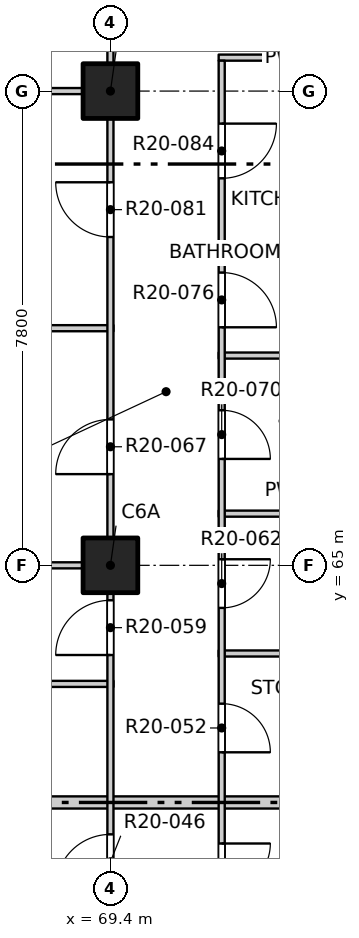
"""IFC4 building model, lengths in metres.
Left out: names, types, materials, properties, quantities, classifications, styles, units other than length and angle.
Written with IfcOpenShell. Run it as: python <this file> out.ifc"""

import sys

from ifc_helpers import new_model, si_unit, direction, frame, frame_2d, origin, origin_2d, place, context, subcontext, project, spatial, rectangle, extrude, element, fill, save


model = new_model("IFC4")
c1 = context("Model", 3, precision=1e-05, world=origin(), true_north=direction((0.0, 1.0)))
c2 = subcontext(c1, "Body", "Model", "MODEL_VIEW")
j1 = project(units=[si_unit("LENGTHUNIT", "METRE"), si_unit("PLANEANGLEUNIT", "RADIAN")], contexts=[c1])
p1 = place(None, origin())
s1 = spatial("IfcSite", under=j1, at=p1, CompositionType="ELEMENT")
p2 = place(p1, origin())
s2 = spatial("IfcBuilding", under=s1, at=p2, CompositionType="ELEMENT")
p3 = place(p2, frame((0.0, 0.0, 210.9)))
s3 = spatial("IfcBuildingStorey", under=s2, at=p3, CompositionType="ELEMENT", Elevation=210.9)
for number, where, z_axis, x_axis in (
    (1, (69.4, 65.0, -0.25), (0.0, 0.0, 1.0), (1.0, 0.0, 0.0)),
    (2, (69.4, 72.8, -0.25), (0.0, 0.0, 1.0), (1.0, 0.0, 0.0)),
):
    element("IfcColumn", number, at=place(p3, frame(where, z_axis=z_axis, x_axis=x_axis)), inside=s3, PredefinedType="COLUMN", context=c2, shape_type="SweptSolid", body=[
        extrude(rectangle(XDim=0.9, YDim=0.9, at=origin_2d()), origin(), (0.0, 0.0, 1.0), 3.4),
    ])
p4 = place(p3, frame((61.9, 61.1, 0.0), z_axis=(0.0, 0.0, 1.0), x_axis=(1.0, 0.0, 0.0)))
e3 = element("IfcWall", 3, at=p4, inside=s3, PredefinedType="PARTITIONING", context=c2, shape_type="SweptSolid", body=[
    extrude(rectangle(XDim=11.5, YDim=0.2, at=frame_2d((5.75, 0.0))), origin(), (0.0, 0.0, 1.0), 2.55),
])
p5 = place(p3, frame((65.75, 63.05, 0.0), z_axis=(0.0, 0.0, 1.0), x_axis=(1.0, 0.0, 0.0)))
e4 = element("IfcWall", 4, at=p5, inside=s3, PredefinedType="PARTITIONING", context=c2, shape_type="SweptSolid", body=[
    extrude(rectangle(XDim=3.7, YDim=0.1, at=frame_2d((1.85, 0.0))), origin(), (0.0, 0.0, 1.0), 3.15),
])
p6 = place(p3, frame((71.18, 63.55, 0.0), z_axis=(0.0, 0.0, 1.0), x_axis=(1.0, 0.0, 0.0)))
e5 = element("IfcWall", 5, at=p6, inside=s3, PredefinedType="PARTITIONING", context=c2, shape_type="SweptSolid", body=[
    extrude(rectangle(XDim=2.22, YDim=0.1, at=frame_2d((1.11, 0.0))), origin(), (0.0, 0.0, 1.0), 3.15),
])
p7 = place(p3, frame((61.9, 65.0, 0.0), z_axis=(0.0, 0.0, 1.0), x_axis=(1.0, 0.0, 0.0)))
e6 = element("IfcWall", 6, at=p7, inside=s3, PredefinedType="PARTITIONING", context=c2, shape_type="SweptSolid", body=[
    extrude(rectangle(XDim=7.55, YDim=0.1, at=frame_2d((3.775, 0.0))), origin(), (0.0, 0.0, 1.0), 3.15),
])
for number, where, z_axis, x_axis in (
    (7, (71.18, 65.85, 0.0), (0.0, 0.0, 1.0), (1.0, 0.0, 0.0)),
    (8, (71.18, 68.45, 0.0), (0.0, 0.0, 1.0), (1.0, 0.0, 0.0)),
):
    element("IfcWall", number, at=place(p3, frame(where, z_axis=z_axis, x_axis=x_axis)), inside=s3, PredefinedType="PARTITIONING", context=c2, shape_type="SweptSolid", body=[
        extrude(rectangle(XDim=2.22, YDim=0.1, at=frame_2d((1.11, 0.0))), origin(), (0.0, 0.0, 1.0), 3.15),
    ])
p8 = place(p3, frame((61.9, 68.9, 0.0), z_axis=(0.0, 0.0, 1.0), x_axis=(1.0, 0.0, 0.0)))
e9 = element("IfcWall", 9, at=p8, inside=s3, PredefinedType="PARTITIONING", context=c2, shape_type="SweptSolid", body=[
    extrude(rectangle(XDim=7.55, YDim=0.1, at=frame_2d((3.775, 0.0))), origin(), (0.0, 0.0, 1.0), 2.55),
])
p9 = place(p3, frame((71.18, 70.28, 0.0), z_axis=(0.0, 0.0, 1.0), x_axis=(1.0, 0.0, 0.0)))
e10 = element("IfcWall", 10, at=p9, inside=s3, PredefinedType="PARTITIONING", context=c2, shape_type="SweptSolid", body=[
    extrude(rectangle(XDim=2.22, YDim=0.1, at=frame_2d((1.11, 0.0))), origin(), (0.0, 0.0, 1.0), 3.15),
])
p10 = place(p3, frame((61.9, 72.8, 0.0), z_axis=(0.0, 0.0, 1.0), x_axis=(1.0, 0.0, 0.0)))
e11 = element("IfcWall", 11, at=p10, inside=s3, PredefinedType="PARTITIONING", context=c2, shape_type="SweptSolid", body=[
    extrude(rectangle(XDim=7.55, YDim=0.1, at=frame_2d((3.775, 0.0))), origin(), (0.0, 0.0, 1.0), 3.15),
])
p11 = place(p3, frame((71.18, 73.35, 0.0), z_axis=(0.0, 0.0, 1.0), x_axis=(1.0, 0.0, 0.0)))
e12 = element("IfcWall", 12, at=p11, inside=s3, PredefinedType="PARTITIONING", context=c2, shape_type="SweptSolid", body=[
    extrude(rectangle(XDim=2.22, YDim=0.1, at=frame_2d((1.11, 0.0))), origin(), (0.0, 0.0, 1.0), 3.15),
])
p12 = place(p3, frame((69.4, 41.9, 0.0), z_axis=(0.0, 0.0, 1.0), x_axis=(0.0, 1.0, 0.0)))
e13 = element("IfcWall", 13, at=p12, inside=s3, PredefinedType="PARTITIONING", context=c2, shape_type="SweptSolid", body=[
    extrude(rectangle(XDim=46.2, YDim=0.1, at=frame_2d((23.1, 0.0))), origin(), (0.0, 0.0, 1.0), 3.15),
])
p13 = place(p12, frame((1.2, 0.0, 0.0)))
e14 = element("IfcOpeningElement", 14, at=p13, cuts=e13, PredefinedType="OPENING", context=c2, shape_type="SweptSolid", body=[
    extrude(rectangle(XDim=0.9, YDim=2.1, at=frame_2d((0.45, 1.05))), frame((0.0, 0.06, 0.0), z_axis=(0.0, -1.0, 0.0), x_axis=(1.0, 0.0, 0.0)), (0.0, 0.0, 1.0), 0.12),
])
p14 = place(p12, frame((5.1, 0.0, 0.0)))
e15 = element("IfcOpeningElement", 15, at=p14, cuts=e13, PredefinedType="OPENING", context=c2, shape_type="SweptSolid", body=[
    extrude(rectangle(XDim=0.9, YDim=2.1, at=frame_2d((0.45, 1.05))), frame((0.0, 0.06, 0.0), z_axis=(0.0, -1.0, 0.0), x_axis=(1.0, 0.0, 0.0)), (0.0, 0.0, 1.0), 0.12),
])
p15 = place(p12, frame((9.975, 0.0, 0.0)))
e16 = element("IfcOpeningElement", 16, at=p15, cuts=e13, PredefinedType="OPENING", context=c2, shape_type="SweptSolid", body=[
    extrude(rectangle(XDim=0.9, YDim=2.1, at=frame_2d((0.45, 1.05))), frame((0.0, 0.06, 0.0), z_axis=(0.0, -1.0, 0.0), x_axis=(1.0, 0.0, 0.0)), (0.0, 0.0, 1.0), 0.12),
])
p16 = place(p12, frame((12.9, 0.0, 0.0)))
e17 = element("IfcOpeningElement", 17, at=p16, cuts=e13, PredefinedType="OPENING", context=c2, shape_type="SweptSolid", body=[
    extrude(rectangle(XDim=0.9, YDim=2.1, at=frame_2d((0.45, 1.05))), frame((0.0, 0.06, 0.0), z_axis=(0.0, -1.0, 0.0), x_axis=(1.0, 0.0, 0.0)), (0.0, 0.0, 1.0), 0.12),
])
p17 = place(p12, frame((17.775, 0.0, 0.0)))
e18 = element("IfcOpeningElement", 18, at=p17, cuts=e13, PredefinedType="OPENING", context=c2, shape_type="SweptSolid", body=[
    extrude(rectangle(XDim=0.9, YDim=2.1, at=frame_2d((0.45, 1.05))), frame((0.0, 0.06, 0.0), z_axis=(0.0, -1.0, 0.0), x_axis=(1.0, 0.0, 0.0)), (0.0, 0.0, 1.0), 0.12),
])
p18 = place(p12, frame((21.625, 0.0, 0.0)))
e19 = element("IfcOpeningElement", 19, at=p18, cuts=e13, PredefinedType="OPENING", context=c2, shape_type="SweptSolid", body=[
    extrude(rectangle(XDim=0.9, YDim=2.1, at=frame_2d((0.45, 1.05))), frame((0.0, 0.06, 0.0), z_axis=(0.0, -1.0, 0.0), x_axis=(1.0, 0.0, 0.0)), (0.0, 0.0, 1.0), 0.12),
])
p19 = place(p12, frame((24.6, 0.0, 0.0)))
e20 = element("IfcOpeningElement", 20, at=p19, cuts=e13, PredefinedType="OPENING", context=c2, shape_type="SweptSolid", body=[
    extrude(rectangle(XDim=0.9, YDim=2.1, at=frame_2d((0.45, 1.05))), frame((0.0, 0.06, 0.0), z_axis=(0.0, -1.0, 0.0), x_axis=(1.0, 0.0, 0.0)), (0.0, 0.0, 1.0), 0.12),
])
p20 = place(p12, frame((28.5, 0.0, 0.0)))
e21 = element("IfcOpeningElement", 21, at=p20, cuts=e13, PredefinedType="OPENING", context=c2, shape_type="SweptSolid", body=[
    extrude(rectangle(XDim=0.9, YDim=2.1, at=frame_2d((0.45, 1.05))), frame((0.0, 0.06, 0.0), z_axis=(0.0, -1.0, 0.0), x_axis=(1.0, 0.0, 0.0)), (0.0, 0.0, 1.0), 0.12),
])
p21 = place(p12, frame((33.375, 0.0, 0.0)))
e22 = element("IfcOpeningElement", 22, at=p21, cuts=e13, PredefinedType="OPENING", context=c2, shape_type="SweptSolid", body=[
    extrude(rectangle(XDim=0.9, YDim=2.1, at=frame_2d((0.45, 1.05))), frame((0.0, 0.06, 0.0), z_axis=(0.0, -1.0, 0.0), x_axis=(1.0, 0.0, 0.0)), (0.0, 0.0, 1.0), 0.12),
])
p22 = place(p12, frame((37.225, 0.0, 0.0)))
e23 = element("IfcOpeningElement", 23, at=p22, cuts=e13, PredefinedType="OPENING", context=c2, shape_type="SweptSolid", body=[
    extrude(rectangle(XDim=0.9, YDim=2.1, at=frame_2d((0.45, 1.05))), frame((0.0, 0.06, 0.0), z_axis=(0.0, -1.0, 0.0), x_axis=(1.0, 0.0, 0.0)), (0.0, 0.0, 1.0), 0.12),
])
p23 = place(p12, frame((40.2, 0.0, 0.0)))
e24 = element("IfcOpeningElement", 24, at=p23, cuts=e13, PredefinedType="OPENING", context=c2, shape_type="SweptSolid", body=[
    extrude(rectangle(XDim=0.9, YDim=2.1, at=frame_2d((0.45, 1.05))), frame((0.0, 0.06, 0.0), z_axis=(0.0, -1.0, 0.0), x_axis=(1.0, 0.0, 0.0)), (0.0, 0.0, 1.0), 0.12),
])
p24 = place(p12, frame((44.1, 0.0, 0.0)))
e25 = element("IfcOpeningElement", 25, at=p24, cuts=e13, PredefinedType="OPENING", context=c2, shape_type="SweptSolid", body=[
    extrude(rectangle(XDim=0.9, YDim=2.1, at=frame_2d((0.45, 1.05))), frame((0.0, 0.06, 0.0), z_axis=(0.0, -1.0, 0.0), x_axis=(1.0, 0.0, 0.0)), (0.0, 0.0, 1.0), 0.12),
])
p25 = place(p3, frame((71.23, 55.05, 0.0), z_axis=(0.0, 0.0, 1.0), x_axis=(0.0, 1.0, 0.0)))
e26 = element("IfcWall", 26, at=p25, inside=s3, PredefinedType="PARTITIONING", context=c2, shape_type="SweptSolid", body=[
    extrude(rectangle(XDim=18.25, YDim=0.1, at=frame_2d((9.125, 0.0))), origin(), (0.0, 0.0, 1.0), 3.15),
])
p26 = place(p25, frame((0.4, 0.0, 0.0)))
e27 = element("IfcOpeningElement", 27, at=p26, cuts=e26, PredefinedType="OPENING", context=c2, shape_type="SweptSolid", body=[
    extrude(rectangle(XDim=0.9, YDim=2.1, at=frame_2d((0.45, 1.05))), frame((0.0, 0.06, 0.0), z_axis=(0.0, -1.0, 0.0), x_axis=(1.0, 0.0, 0.0)), (0.0, 0.0, 1.0), 0.12),
])
p27 = place(p25, frame((2.425, 0.0, 0.0)))
e28 = element("IfcOpeningElement", 28, at=p27, cuts=e26, PredefinedType="OPENING", context=c2, shape_type="SweptSolid", body=[
    extrude(rectangle(XDim=0.8, YDim=2.1, at=frame_2d((0.4, 1.05))), frame((0.0, 0.06, 0.0), z_axis=(0.0, -1.0, 0.0), x_axis=(1.0, 0.0, 0.0)), (0.0, 0.0, 1.0), 0.12),
])
p28 = place(p25, frame((4.575, 0.0, 0.0)))
e29 = element("IfcOpeningElement", 29, at=p28, cuts=e26, PredefinedType="OPENING", context=c2, shape_type="SweptSolid", body=[
    extrude(rectangle(XDim=0.8, YDim=2.1, at=frame_2d((0.4, 1.05))), frame((0.0, 0.06, 0.0), z_axis=(0.0, -1.0, 0.0), x_axis=(1.0, 0.0, 0.0)), (0.0, 0.0, 1.0), 0.12),
])
p29 = place(p25, frame((6.875, 0.0, 0.0)))
e30 = element("IfcOpeningElement", 30, at=p29, cuts=e26, PredefinedType="OPENING", context=c2, shape_type="SweptSolid", body=[
    extrude(rectangle(XDim=0.8, YDim=2.1, at=frame_2d((0.4, 1.05))), frame((0.0, 0.06, 0.0), z_axis=(0.0, -1.0, 0.0), x_axis=(1.0, 0.0, 0.0)), (0.0, 0.0, 1.0), 0.12),
])
p30 = place(p25, frame((9.25, 0.0, 0.0)))
e31 = element("IfcOpeningElement", 31, at=p30, cuts=e26, PredefinedType="OPENING", context=c2, shape_type="SweptSolid", body=[
    extrude(rectangle(XDim=0.8, YDim=2.1, at=frame_2d((0.4, 1.05))), frame((0.0, 0.06, 0.0), z_axis=(0.0, -1.0, 0.0), x_axis=(1.0, 0.0, 0.0)), (0.0, 0.0, 1.0), 0.12),
])
p31 = place(p25, frame((11.7, 0.0, 0.0)))
e32 = element("IfcOpeningElement", 32, at=p31, cuts=e26, PredefinedType="OPENING", context=c2, shape_type="SweptSolid", body=[
    extrude(rectangle(XDim=0.8, YDim=2.1, at=frame_2d((0.4, 1.05))), frame((0.0, 0.06, 0.0), z_axis=(0.0, -1.0, 0.0), x_axis=(1.0, 0.0, 0.0)), (0.0, 0.0, 1.0), 0.12),
])
p32 = place(p25, frame((13.865, 0.0, 0.0)))
e33 = element("IfcOpeningElement", 33, at=p32, cuts=e26, PredefinedType="OPENING", context=c2, shape_type="SweptSolid", body=[
    extrude(rectangle(XDim=0.9, YDim=2.1, at=frame_2d((0.45, 1.05))), frame((0.0, 0.06, 0.0), z_axis=(0.0, -1.0, 0.0), x_axis=(1.0, 0.0, 0.0)), (0.0, 0.0, 1.0), 0.12),
])
p33 = place(p25, frame((16.315, 0.0, 0.0)))
e34 = element("IfcOpeningElement", 34, at=p33, cuts=e26, PredefinedType="OPENING", context=c2, shape_type="SweptSolid", body=[
    extrude(rectangle(XDim=0.9, YDim=2.1, at=frame_2d((0.45, 1.05))), frame((0.0, 0.06, 0.0), z_axis=(0.0, -1.0, 0.0), x_axis=(1.0, 0.0, 0.0)), (0.0, 0.0, 1.0), 0.12),
])
p34 = place(p28, origin())
e35 = element("IfcDoor", 35, at=p34, inside=s3, OperationType="SINGLE_SWING_LEFT", PredefinedType="DOOR", context=c2, shape_type="SweptSolid", body=[
    extrude(rectangle(XDim=0.8, YDim=2.1, at=frame_2d((0.4, 1.05))), frame((0.0, 0.025, 0.0), z_axis=(0.0, -1.0, 0.0), x_axis=(1.0, 0.0, 0.0)), (0.0, 0.0, 1.0), 0.05),
])
fill(e29, e35)
p35 = place(p17, origin())
e36 = element("IfcDoor", 36, at=p35, inside=s3, OperationType="SINGLE_SWING_LEFT", PredefinedType="DOOR", context=c2, shape_type="SweptSolid", body=[
    extrude(rectangle(XDim=0.9, YDim=2.1, at=frame_2d((0.45, 1.05))), frame((0.0, 0.025, 0.0), z_axis=(0.0, -1.0, 0.0), x_axis=(1.0, 0.0, 0.0)), (0.0, 0.0, 1.0), 0.05),
])
fill(e18, e36)
p36 = place(p29, origin())
e37 = element("IfcDoor", 37, at=p36, inside=s3, OperationType="SINGLE_SWING_RIGHT", PredefinedType="DOOR", context=c2, shape_type="SweptSolid", body=[
    extrude(rectangle(XDim=0.8, YDim=2.1, at=frame_2d((0.4, 1.05))), frame((0.0, 0.025, 0.0), z_axis=(0.0, -1.0, 0.0), x_axis=(1.0, 0.0, 0.0)), (0.0, 0.0, 1.0), 0.05),
])
fill(e30, e37)
p37 = place(p18, origin())
e38 = element("IfcDoor", 38, at=p37, inside=s3, OperationType="SINGLE_SWING_LEFT", PredefinedType="DOOR", context=c2, shape_type="SweptSolid", body=[
    extrude(rectangle(XDim=0.9, YDim=2.1, at=frame_2d((0.45, 1.05))), frame((0.0, 0.025, 0.0), z_axis=(0.0, -1.0, 0.0), x_axis=(1.0, 0.0, 0.0)), (0.0, 0.0, 1.0), 0.05),
])
fill(e19, e38)
p38 = place(p30, origin())
e39 = element("IfcDoor", 39, at=p38, inside=s3, OperationType="SINGLE_SWING_LEFT", PredefinedType="DOOR", context=c2, shape_type="SweptSolid", body=[
    extrude(rectangle(XDim=0.8, YDim=2.1, at=frame_2d((0.4, 1.05))), frame((0.0, 0.025, 0.0), z_axis=(0.0, -1.0, 0.0), x_axis=(1.0, 0.0, 0.0)), (0.0, 0.0, 1.0), 0.05),
])
fill(e31, e39)
p39 = place(p19, origin())
e40 = element("IfcDoor", 40, at=p39, inside=s3, OperationType="SINGLE_SWING_LEFT", PredefinedType="DOOR", context=c2, shape_type="SweptSolid", body=[
    extrude(rectangle(XDim=0.9, YDim=2.1, at=frame_2d((0.45, 1.05))), frame((0.0, 0.025, 0.0), z_axis=(0.0, -1.0, 0.0), x_axis=(1.0, 0.0, 0.0)), (0.0, 0.0, 1.0), 0.05),
])
fill(e20, e40)
p40 = place(p31, origin())
e41 = element("IfcDoor", 41, at=p40, inside=s3, OperationType="SINGLE_SWING_RIGHT", PredefinedType="DOOR", context=c2, shape_type="SweptSolid", body=[
    extrude(rectangle(XDim=0.8, YDim=2.1, at=frame_2d((0.4, 1.05))), frame((0.0, 0.025, 0.0), z_axis=(0.0, -1.0, 0.0), x_axis=(1.0, 0.0, 0.0)), (0.0, 0.0, 1.0), 0.05),
])
fill(e32, e41)
p41 = place(p32, origin())
e42 = element("IfcDoor", 42, at=p41, inside=s3, OperationType="SINGLE_SWING_RIGHT", PredefinedType="DOOR", context=c2, shape_type="SweptSolid", body=[
    extrude(rectangle(XDim=0.9, YDim=2.1, at=frame_2d((0.45, 1.05))), frame((0.0, 0.025, 0.0), z_axis=(0.0, -1.0, 0.0), x_axis=(1.0, 0.0, 0.0)), (0.0, 0.0, 1.0), 0.05),
])
fill(e33, e42)
p42 = place(p20, origin())
e43 = element("IfcDoor", 43, at=p42, inside=s3, OperationType="SINGLE_SWING_RIGHT", PredefinedType="DOOR", context=c2, shape_type="SweptSolid", body=[
    extrude(rectangle(XDim=0.9, YDim=2.1, at=frame_2d((0.45, 1.05))), frame((0.0, 0.025, 0.0), z_axis=(0.0, -1.0, 0.0), x_axis=(1.0, 0.0, 0.0)), (0.0, 0.0, 1.0), 0.05),
])
fill(e21, e43)
p43 = place(p33, origin())
e44 = element("IfcDoor", 44, at=p43, inside=s3, OperationType="SINGLE_SWING_LEFT", PredefinedType="DOOR", context=c2, shape_type="SweptSolid", body=[
    extrude(rectangle(XDim=0.9, YDim=2.1, at=frame_2d((0.45, 1.05))), frame((0.0, 0.025, 0.0), z_axis=(0.0, -1.0, 0.0), x_axis=(1.0, 0.0, 0.0)), (0.0, 0.0, 1.0), 0.05),
])
fill(e34, e44)
save(model, sys.argv[1])
